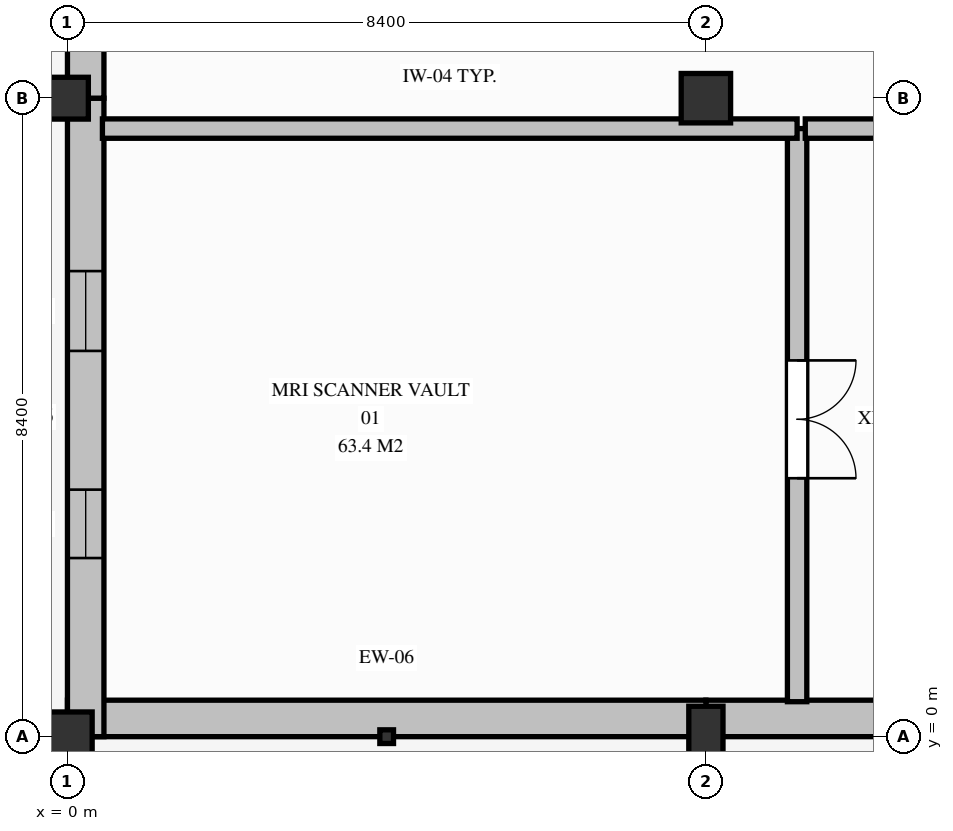
"""IFC4 building model, lengths in metres.
Left out: names, types, materials, properties, quantities, classifications, styles, units other than length and angle.
Written with IfcOpenShell. Run it as: python <this file> out.ifc"""

import sys

from ifc_helpers import new_model, si_unit, direction, frame, frame_2d, origin, origin_with_axes, origin_2d, place, context, subcontext, project, spatial, rectangle, hollow_rectangle, circle, extrude, element, fill, save


model = new_model("IFC4")
c1 = context("Model", 3, precision=1e-05, world=origin(), true_north=direction((0.0, 1.0)))
c2 = subcontext(c1, "Body", "Model", "MODEL_VIEW")
j1 = project(units=[si_unit("LENGTHUNIT", "METRE"), si_unit("PLANEANGLEUNIT", "RADIAN")], contexts=[c1])
p1 = place(None, origin())
s1 = spatial("IfcSite", under=j1, at=p1, CompositionType="ELEMENT")
p2 = place(p1, origin())
s2 = spatial("IfcBuilding", under=s1, at=p2, CompositionType="ELEMENT")
p3 = place(p2, origin())
s3 = spatial("IfcBuildingStorey", under=s2, at=p3, CompositionType="ELEMENT", Elevation=0.0)
p4 = place(p3, origin_with_axes())
e1 = element("IfcColumn", 1, at=p4, inside=s3, PredefinedType="COLUMN", context=c2, shape_type="SweptSolid", body=[
    extrude(circle(Radius=0.325, at=origin_2d()), origin(), (0.0, 0.0, 1.0), 4.5),
])
p5 = place(p3, frame((0.0, 8.4, 0.0), z_axis=(0.0, 0.0, 1.0), x_axis=(1.0, 0.0, 0.0)))
e2 = element("IfcColumn", 2, at=p5, inside=s3, PredefinedType="COLUMN", context=c2, shape_type="SweptSolid", body=[
    extrude(circle(Radius=0.275, at=origin_2d()), origin(), (0.0, 0.0, 1.0), 4.5),
])
p6 = place(p3, frame((8.4, 0.0, 0.0), z_axis=(0.0, 0.0, 1.0), x_axis=(1.0, 0.0, 0.0)))
e3 = element("IfcColumn", 3, at=p6, inside=s3, PredefinedType="COLUMN", context=c2, shape_type="SweptSolid", body=[
    extrude(rectangle(XDim=0.45, YDim=0.8, at=origin_2d()), origin(), (0.0, 0.0, 1.0), 4.5),
])
p7 = place(p3, frame((8.4, 8.4, 0.0), z_axis=(0.0, 0.0, 1.0), x_axis=(1.0, 0.0, 0.0)))
e4 = element("IfcColumn", 4, at=p7, inside=s3, PredefinedType="COLUMN", context=c2, shape_type="SweptSolid", body=[
    extrude(circle(Radius=0.325, at=origin_2d()), origin(), (0.0, 0.0, 1.0), 4.5),
])
p8 = place(p3, frame((4.2, 0.0, 0.0), z_axis=(0.0, 0.0, 1.0), x_axis=(1.0, 0.0, 0.0)))
e5 = element("IfcColumn", 5, at=p8, inside=s3, PredefinedType="PILASTER", context=c2, shape_type="SweptSolid", body=[
    extrude(hollow_rectangle(XDim=0.18, YDim=0.18, WallThickness=0.01, InnerFilletRadius=0.015, OuterFilletRadius=0.025, at=origin_2d()), origin(), (0.0, 0.0, 1.0), 4.5),
])
p9 = place(p3, frame((16.8, 0.24, 0.0), z_axis=(0.0, 0.0, 1.0), x_axis=(-1.0, 0.0, 0.0)))
e6 = element("IfcWall", 6, at=p9, inside=s3, PredefinedType="SOLIDWALL", context=c2, shape_type="SweptSolid", body=[
    extrude(rectangle(XDim=8.4, YDim=0.48, at=frame_2d((4.2, 0.0))), origin(), (0.0, 0.0, 1.0), 2.828),
])
p10 = place(p9, frame((3.425, 0.0, 0.85)))
e7 = element("IfcOpeningElement", 7, at=p10, cuts=e6, PredefinedType="OPENING", context=c2, shape_type="SweptSolid", body=[
    extrude(rectangle(XDim=1.55, YDim=1.6, at=frame_2d((0.775, 0.8))), frame((0.0, 0.25, 0.0), z_axis=(0.0, -1.0, 0.0), x_axis=(1.0, 0.0, 0.0)), (0.0, 0.0, 1.0), 0.5),
])
p11 = place(p3, frame((8.4, 0.24, 0.0), z_axis=(0.0, 0.0, 1.0), x_axis=(-1.0, 0.0, 0.0)))
e8 = element("IfcWall", 8, at=p11, inside=s3, PredefinedType="SOLIDWALL", context=c2, shape_type="SweptSolid", body=[
    extrude(rectangle(XDim=8.4, YDim=0.48, at=frame_2d((4.2, 0.0))), origin(), (0.0, 0.0, 1.0), 2.828),
])
p12 = place(p3, frame((0.24, 0.0, 0.0), z_axis=(0.0, 0.0, 1.0), x_axis=(0.0, 1.0, 0.0)))
e9 = element("IfcWall", 9, at=p12, inside=s3, PredefinedType="SOLIDWALL", context=c2, shape_type="SweptSolid", body=[
    extrude(rectangle(XDim=8.4, YDim=0.48, at=frame_2d((4.2, 0.0))), origin(), (0.0, 0.0, 1.0), 2.828),
])
p13 = place(p12, frame((2.35, 0.0, 0.85)))
e10 = element("IfcOpeningElement", 10, at=p13, cuts=e9, PredefinedType="OPENING", context=c2, shape_type="SweptSolid", body=[
    extrude(rectangle(XDim=0.9, YDim=1.8, at=frame_2d((0.45, 0.9))), frame((0.0, 0.25, 0.0), z_axis=(0.0, -1.0, 0.0), x_axis=(1.0, 0.0, 0.0)), (0.0, 0.0, 1.0), 0.5),
])
p14 = place(p12, frame((5.075, 0.0, 0.85)))
e11 = element("IfcOpeningElement", 11, at=p14, cuts=e9, PredefinedType="OPENING", context=c2, shape_type="SweptSolid", body=[
    extrude(rectangle(XDim=1.05, YDim=1.75, at=frame_2d((0.525, 0.875))), frame((0.0, 0.25, 0.0), z_axis=(0.0, -1.0, 0.0), x_axis=(1.0, 0.0, 0.0)), (0.0, 0.0, 1.0), 0.5),
])
p15 = place(p3, frame((0.24, 8.4, 0.0), z_axis=(0.0, 0.0, 1.0), x_axis=(0.0, 1.0, 0.0)))
e12 = element("IfcWall", 12, at=p15, inside=s3, PredefinedType="SOLIDWALL", context=c2, shape_type="SweptSolid", body=[
    extrude(rectangle(XDim=8.4, YDim=0.48, at=frame_2d((4.2, 0.0))), origin(), (0.0, 0.0, 1.0), 3.773),
])
p16 = place(p15, frame((2.35, 0.0, 0.85)))
e13 = element("IfcOpeningElement", 13, at=p16, cuts=e12, PredefinedType="OPENING", context=c2, shape_type="SweptSolid", body=[
    extrude(rectangle(XDim=0.9, YDim=1.8, at=frame_2d((0.45, 0.9))), frame((0.0, 0.25, 0.0), z_axis=(0.0, -1.0, 0.0), x_axis=(1.0, 0.0, 0.0)), (0.0, 0.0, 1.0), 0.5),
])
p17 = place(p15, frame((5.075, 0.0, 0.85)))
e14 = element("IfcOpeningElement", 14, at=p17, cuts=e12, PredefinedType="OPENING", context=c2, shape_type="SweptSolid", body=[
    extrude(rectangle(XDim=1.05, YDim=1.75, at=frame_2d((0.525, 0.875))), frame((0.0, 0.25, 0.0), z_axis=(0.0, -1.0, 0.0), x_axis=(1.0, 0.0, 0.0)), (0.0, 0.0, 1.0), 0.5),
])
p18 = place(p3, frame((9.6, 8.0, 0.0), z_axis=(0.0, 0.0, 1.0), x_axis=(0.0, -1.0, 0.0)))
e15 = element("IfcWall", 15, at=p18, inside=s3, PredefinedType="PARTITIONING", context=c2, shape_type="SweptSolid", body=[
    extrude(rectangle(XDim=7.54, YDim=0.255, at=frame_2d((3.77, 0.0))), origin(), (0.0, 0.0, 1.0), 3.913),
])
p19 = place(p18, frame((3.05, 0.0, 0.0)))
e16 = element("IfcOpeningElement", 16, at=p19, cuts=e15, PredefinedType="OPENING", context=c2, shape_type="SweptSolid", body=[
    extrude(rectangle(XDim=1.55, YDim=2.22, at=frame_2d((0.775, 1.11))), frame((0.0, 0.137, 0.0), z_axis=(0.0, -1.0, 0.0), x_axis=(1.0, 0.0, 0.0)), (0.0, 0.0, 1.0), 0.275),
])
p20 = place(p3, frame((0.46, 8.0, 0.0), z_axis=(0.0, 0.0, 1.0), x_axis=(1.0, 0.0, 0.0)))
e17 = element("IfcWall", 17, at=p20, inside=s3, PredefinedType="PARTITIONING", context=c2, shape_type="SweptSolid", body=[
    extrude(rectangle(XDim=9.14, YDim=0.255, at=frame_2d((4.57, 0.0))), origin(), (0.0, 0.0, 1.0), 3.873),
])
p21 = place(p3, frame((9.708, 8.0, 0.0), z_axis=(0.0, 0.0, 1.0), x_axis=(1.0, 0.0, 0.0)))
e18 = element("IfcWall", 18, at=p21, inside=s3, PredefinedType="PARTITIONING", context=c2, shape_type="SweptSolid", body=[
    extrude(rectangle(XDim=9.292, YDim=0.255, at=frame_2d((4.646, 0.0))), origin(), (0.0, 0.0, 1.0), 3.763),
])
p22 = place(p21, frame((4.242, 0.0, 0.0)))
e19 = element("IfcOpeningElement", 19, at=p22, cuts=e18, PredefinedType="OPENING", context=c2, shape_type="SweptSolid", body=[
    extrude(rectangle(XDim=1.55, YDim=2.22, at=frame_2d((0.775, 1.11))), frame((0.0, 0.137, 0.0), z_axis=(0.0, -1.0, 0.0), x_axis=(1.0, 0.0, 0.0)), (0.0, 0.0, 1.0), 0.275),
])
p23 = place(p13, origin())
e20 = element("IfcWindow", 20, at=p23, inside=s3, PartitioningType="SINGLE_PANEL", PredefinedType="WINDOW", context=c2, shape_type="SweptSolid", body=[
    extrude(rectangle(XDim=0.9, YDim=1.8, at=frame_2d((0.45, 0.9))), frame((0.0, 0.03, 0.0), z_axis=(0.0, -1.0, 0.0), x_axis=(1.0, 0.0, 0.0)), (0.0, 0.0, 1.0), 0.06),
])
fill(e10, e20)
p24 = place(p14, origin())
e21 = element("IfcWindow", 21, at=p24, inside=s3, PartitioningType="SINGLE_PANEL", PredefinedType="WINDOW", context=c2, shape_type="SweptSolid", body=[
    extrude(rectangle(XDim=1.05, YDim=1.75, at=frame_2d((0.525, 0.875))), frame((0.0, 0.03, 0.0), z_axis=(0.0, -1.0, 0.0), x_axis=(1.0, 0.0, 0.0)), (0.0, 0.0, 1.0), 0.06),
])
fill(e11, e21)
p25 = place(p19, origin())
e22 = element("IfcDoor", 22, at=p25, inside=s3, OperationType="DOUBLE_DOOR_SINGLE_SWING", PredefinedType="DOOR", context=c2, shape_type="SweptSolid", body=[
    extrude(rectangle(XDim=1.55, YDim=2.22, at=frame_2d((0.775, 1.11))), frame((0.0, 0.025, 0.0), z_axis=(0.0, -1.0, 0.0), x_axis=(1.0, 0.0, 0.0)), (0.0, 0.0, 1.0), 0.05),
])
fill(e16, e22)
save(model, sys.argv[1])
